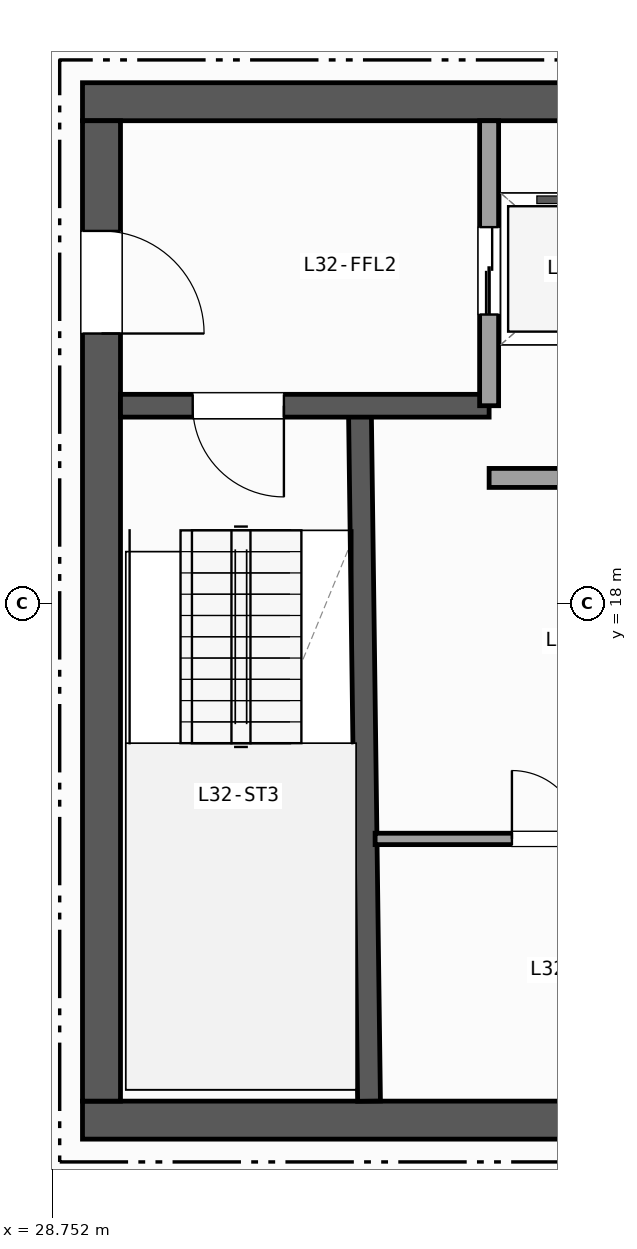
"""IFC4 building model, lengths in metres.
Left out: names, types, materials, properties, quantities, classifications, styles, units other than length and angle.
Written with IfcOpenShell. Run it as: python <this file> out.ifc"""

import sys

from ifc_helpers import new_model, si_unit, direction, frame, frame_2d, origin, place, context, subcontext, project, spatial, rectangle, extrude, element, fill, save


model = new_model("IFC4")
c1 = context("Model", 3, precision=1e-05, world=origin(), true_north=direction((0.0, 1.0)))
c2 = subcontext(c1, "Body", "Model", "MODEL_VIEW")
j1 = project(units=[si_unit("LENGTHUNIT", "METRE"), si_unit("PLANEANGLEUNIT", "RADIAN")], contexts=[c1])
p1 = place(None, origin())
s1 = spatial("IfcSite", under=j1, at=p1, CompositionType="ELEMENT")
p2 = place(p1, origin())
s2 = spatial("IfcBuilding", under=s1, at=p2, CompositionType="ELEMENT")
p3 = place(p2, frame((0.0, 0.0, 132.2)))
s3 = spatial("IfcBuildingStorey", under=s2, at=p3, CompositionType="ELEMENT", Elevation=132.2)
p4 = place(p3, frame((29.15, 11.2, 0.0), z_axis=(0.0, 0.0, 1.0), x_axis=(1.0, 0.0, 0.0)))
e1 = element("IfcWall", 1, at=p4, inside=s3, PredefinedType="SHEAR", context=c2, shape_type="SweptSolid", body=[
    extrude(rectangle(XDim=13.9, YDim=0.5, at=frame_2d((6.95, 0.0))), origin(), (0.0, 0.0, 1.0), 3.42),
])
p5 = place(p3, frame((43.05, 24.6, 0.0), z_axis=(0.0, 0.0, 1.0), x_axis=(-1.0, 0.0, 0.0)))
e2 = element("IfcWall", 2, at=p5, inside=s3, PredefinedType="SHEAR", context=c2, shape_type="SweptSolid", body=[
    extrude(rectangle(XDim=13.9, YDim=0.5, at=frame_2d((6.95, 0.0))), origin(), (0.0, 0.0, 1.0), 3.42),
])
p6 = place(p5, frame((0.75, 0.0, 0.0)))
e3 = element("IfcOpeningElement", 3, at=p6, cuts=e2, PredefinedType="OPENING", context=c2, shape_type="SweptSolid", body=[
    extrude(rectangle(XDim=1.1, YDim=2.15, at=frame_2d((0.55, 1.075))), frame((0.0, 0.26, 0.0), z_axis=(0.0, -1.0, 0.0), x_axis=(1.0, 0.0, 0.0)), (0.0, 0.0, 1.0), 0.52),
])
p7 = place(p5, frame((2.25, 0.0, 0.0)))
e4 = element("IfcOpeningElement", 4, at=p7, cuts=e2, PredefinedType="OPENING", context=c2, shape_type="SweptSolid", body=[
    extrude(rectangle(XDim=0.9, YDim=2.1, at=frame_2d((0.45, 1.05))), frame((0.0, 0.26, 0.0), z_axis=(0.0, -1.0, 0.0), x_axis=(1.0, 0.0, 0.0)), (0.0, 0.0, 1.0), 0.52),
])
p8 = place(p5, frame((3.55, 0.0, 0.0)))
e5 = element("IfcOpeningElement", 5, at=p8, cuts=e2, PredefinedType="OPENING", context=c2, shape_type="SweptSolid", body=[
    extrude(rectangle(XDim=0.9, YDim=2.1, at=frame_2d((0.45, 1.05))), frame((0.0, 0.26, 0.0), z_axis=(0.0, -1.0, 0.0), x_axis=(1.0, 0.0, 0.0)), (0.0, 0.0, 1.0), 0.52),
])
p9 = place(p5, frame((4.9, 0.0, 0.0)))
e6 = element("IfcOpeningElement", 6, at=p9, cuts=e2, PredefinedType="OPENING", context=c2, shape_type="SweptSolid", body=[
    extrude(rectangle(XDim=0.9, YDim=2.1, at=frame_2d((0.45, 1.05))), frame((0.0, 0.26, 0.0), z_axis=(0.0, -1.0, 0.0), x_axis=(1.0, 0.0, 0.0)), (0.0, 0.0, 1.0), 0.52),
])
p10 = place(p3, frame((29.4, 24.35, 0.0), z_axis=(0.0, 0.0, 1.0), x_axis=(0.0, -1.0, 0.0)))
e7 = element("IfcWall", 7, at=p10, inside=s3, PredefinedType="SHEAR", context=c2, shape_type="SweptSolid", body=[
    extrude(rectangle(XDim=12.9, YDim=0.5, at=frame_2d((6.45, 0.0))), origin(), (0.0, 0.0, 1.0), 3.42),
])
p11 = place(p10, frame((1.45, 0.0, 0.0)))
e8 = element("IfcOpeningElement", 8, at=p11, cuts=e7, PredefinedType="OPENING", context=c2, shape_type="SweptSolid", body=[
    extrude(rectangle(XDim=1.35, YDim=2.15, at=frame_2d((0.675, 1.075))), frame((0.0, 0.26, 0.0), z_axis=(0.0, -1.0, 0.0), x_axis=(1.0, 0.0, 0.0)), (0.0, 0.0, 1.0), 0.52),
])
p12 = place(p3, frame((32.92, 11.45, 0.0), z_axis=(0.0, 0.0, 1.0), x_axis=(-0.013171578211, 0.999913251001, 0.0)))
e9 = element("IfcWall", 9, at=p12, inside=s3, PredefinedType="SHEAR", context=c2, shape_type="SweptSolid", body=[
    extrude(rectangle(XDim=9.101, YDim=0.3, at=frame_2d((4.55, 0.0))), origin(), (0.0, 0.0, 1.0), 3.42),
])
p13 = place(p3, frame((34.5, 20.6, 0.0), z_axis=(0.0, 0.0, 1.0), x_axis=(-1.0, 0.0, 0.0)))
e10 = element("IfcWall", 10, at=p13, inside=s3, PredefinedType="SHEAR", context=c2, shape_type="SweptSolid", body=[
    extrude(rectangle(XDim=4.85, YDim=0.3, at=frame_2d((2.425, 0.0))), origin(), (0.0, 0.0, 1.0), 3.42),
])
p14 = place(p13, frame((2.7, 0.0, 0.0)))
e11 = element("IfcOpeningElement", 11, at=p14, cuts=e10, PredefinedType="OPENING", context=c2, shape_type="SweptSolid", body=[
    extrude(rectangle(XDim=1.2, YDim=2.15, at=frame_2d((0.6, 1.075))), frame((0.0, 0.16, 0.0), z_axis=(0.0, -1.0, 0.0), x_axis=(1.0, 0.0, 0.0)), (0.0, 0.0, 1.0), 0.32),
])
p15 = place(p3, frame((34.5, 20.6, 0.0), z_axis=(0.0, 0.0, 1.0), x_axis=(0.0, 1.0, 0.0)))
e12 = element("IfcWall", 12, at=p15, inside=s3, PredefinedType="PARTITIONING", context=c2, shape_type="SweptSolid", body=[
    extrude(rectangle(XDim=3.75, YDim=0.25, at=frame_2d((1.875, 0.0))), origin(), (0.0, 0.0, 1.0), 3.42),
])
p16 = place(p15, frame((1.2, 0.0, 0.0)))
e13 = element("IfcOpeningElement", 13, at=p16, cuts=e12, PredefinedType="OPENING", context=c2, shape_type="SweptSolid", body=[
    extrude(rectangle(XDim=1.15, YDim=2.15, at=frame_2d((0.575, 1.075))), frame((0.0, 0.135, 0.0), z_axis=(0.0, -1.0, 0.0), x_axis=(1.0, 0.0, 0.0)), (0.0, 0.0, 1.0), 0.27),
])
p17 = place(p3, frame((34.5, 19.65, 0.0), z_axis=(0.0, 0.0, 1.0), x_axis=(1.0, 0.0, 0.0)))
e14 = element("IfcWall", 14, at=p17, inside=s3, PredefinedType="PARTITIONING", context=c2, shape_type="SweptSolid", body=[
    extrude(rectangle(XDim=6.48, YDim=0.25, at=frame_2d((3.24, 0.0))), origin(), (0.0, 0.0, 1.0), 3.42),
])
p18 = place(p3, frame((33.0, 14.9, 0.0), z_axis=(0.0, 0.0, 1.0), x_axis=(1.0, 0.0, 0.0)))
e15 = element("IfcWall", 15, at=p18, inside=s3, PredefinedType="PARTITIONING", context=c2, shape_type="SweptSolid", body=[
    extrude(rectangle(XDim=5.1, YDim=0.15, at=frame_2d((2.55, 0.0))), origin(), (0.0, 0.0, 1.0), 3.42),
])
p19 = place(p18, frame((1.8, 0.0, 0.0)))
e16 = element("IfcOpeningElement", 16, at=p19, cuts=e15, PredefinedType="OPENING", context=c2, shape_type="SweptSolid", body=[
    extrude(rectangle(XDim=0.9, YDim=2.1, at=frame_2d((0.45, 1.05))), frame((0.0, 0.085, 0.0), z_axis=(0.0, -1.0, 0.0), x_axis=(1.0, 0.0, 0.0)), (0.0, 0.0, 1.0), 0.17),
])
p20 = place(p14, origin())
e17 = element("IfcDoor", 17, at=p20, inside=s3, OperationType="SINGLE_SWING_LEFT", PredefinedType="DOOR", context=c2, shape_type="SweptSolid", body=[
    extrude(rectangle(XDim=1.2, YDim=2.15, at=frame_2d((0.6, 1.075))), frame((0.0, 0.025, 0.0), z_axis=(0.0, -1.0, 0.0), x_axis=(1.0, 0.0, 0.0)), (0.0, 0.0, 1.0), 0.05),
])
fill(e11, e17)
p21 = place(p11, origin())
e18 = element("IfcDoor", 18, at=p21, inside=s3, OperationType="SINGLE_SWING_RIGHT", PredefinedType="DOOR", context=c2, shape_type="SweptSolid", body=[
    extrude(rectangle(XDim=1.35, YDim=2.15, at=frame_2d((0.675, 1.075))), frame((0.0, 0.025, 0.0), z_axis=(0.0, -1.0, 0.0), x_axis=(1.0, 0.0, 0.0)), (0.0, 0.0, 1.0), 0.05),
])
fill(e8, e18)
p22 = place(p16, origin())
e19 = element("IfcDoor", 19, at=p22, inside=s3, OperationType="DOUBLE_DOOR_SLIDING", PredefinedType="DOOR", context=c2, shape_type="SweptSolid", body=[
    extrude(rectangle(XDim=1.15, YDim=2.15, at=frame_2d((0.575, 1.075))), frame((0.0, 0.025, 0.0), z_axis=(0.0, -1.0, 0.0), x_axis=(1.0, 0.0, 0.0)), (0.0, 0.0, 1.0), 0.05),
])
fill(e13, e19)
p23 = place(p19, origin())
e20 = element("IfcDoor", 20, at=p23, inside=s3, OperationType="SINGLE_SWING_LEFT", PredefinedType="DOOR", context=c2, shape_type="SweptSolid", body=[
    extrude(rectangle(XDim=0.9, YDim=2.1, at=frame_2d((0.45, 1.05))), frame((0.0, 0.025, 0.0), z_axis=(0.0, -1.0, 0.0), x_axis=(1.0, 0.0, 0.0)), (0.0, 0.0, 1.0), 0.05),
])
fill(e16, e20)
save(model, sys.argv[1])
